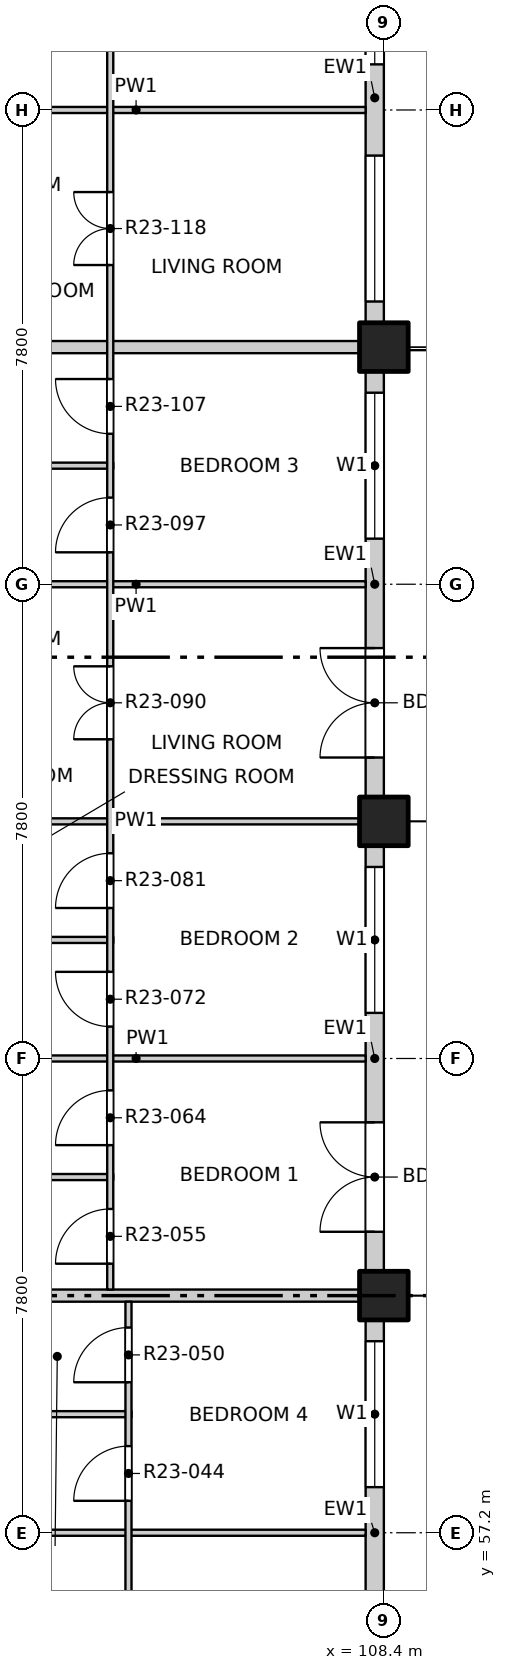
"""IFC4 building model, lengths in metres.
Left out: names, types, materials, properties, quantities, classifications, styles, units other than length and angle.
Written with IfcOpenShell. Run it as: python <this file> out.ifc"""

import sys

from ifc_helpers import new_model, si_unit, direction, frame, frame_2d, origin, origin_2d, place, context, subcontext, project, spatial, rectangle, extrude, element, fill, save


model = new_model("IFC4")
c1 = context("Model", 3, precision=1e-05, world=origin(), true_north=direction((0.0, 1.0)))
c2 = subcontext(c1, "Body", "Model", "MODEL_VIEW")
j1 = project(units=[si_unit("LENGTHUNIT", "METRE"), si_unit("PLANEANGLEUNIT", "RADIAN")], contexts=[c1])
p1 = place(None, origin())
s1 = spatial("IfcSite", under=j1, at=p1, CompositionType="ELEMENT")
p2 = place(p1, origin())
s2 = spatial("IfcBuilding", under=s1, at=p2, CompositionType="ELEMENT")
p3 = place(p2, frame((0.0, 0.0, 238.1)))
s3 = spatial("IfcBuildingStorey", under=s2, at=p3, CompositionType="ELEMENT", Elevation=238.1)
for number, where, z_axis, x_axis in (
    (1, (108.4, 61.1, -0.25), (0.0, 0.0, 1.0), (1.0, 0.0, 0.0)),
    (2, (108.4, 68.9, -0.25), (0.0, 0.0, 1.0), (1.0, 0.0, 0.0)),
    (3, (108.4, 76.7, -0.25), (0.0, 0.0, 1.0), (1.0, 0.0, 0.0)),
):
    element("IfcColumn", number, at=place(p3, frame(where, z_axis=z_axis, x_axis=x_axis)), inside=s3, PredefinedType="COLUMN", context=c2, shape_type="SweptSolid", body=[
        extrude(rectangle(XDim=0.8, YDim=0.8, at=origin_2d()), origin(), (0.0, 0.0, 1.0), 3.35),
    ])
p4 = place(p3, frame((108.25, 53.7, 0.0), z_axis=(0.0, 0.0, 1.0), x_axis=(0.0, 1.0, 0.0)))
e4 = element("IfcWall", 4, at=p4, inside=s3, PredefinedType="SOLIDWALL", context=c2, shape_type="SweptSolid", body=[
    extrude(rectangle(XDim=7.0, YDim=0.3, at=frame_2d((3.5, 0.0))), origin(), (0.0, 0.0, 1.0), 3.1),
])
p5 = place(p4, frame((0.65, 0.0, 0.0)))
e5 = element("IfcOpeningElement", 5, at=p5, cuts=e4, PredefinedType="OPENING", context=c2, shape_type="SweptSolid", body=[
    extrude(rectangle(XDim=1.8, YDim=2.4, at=frame_2d((0.9, 1.2))), frame((0.0, 0.16, 0.0), z_axis=(0.0, -1.0, 0.0), x_axis=(1.0, 0.0, 0.0)), (0.0, 0.0, 1.0), 0.32),
])
p6 = place(p4, frame((4.25, 0.0, 0.9)))
e6 = element("IfcOpeningElement", 6, at=p6, cuts=e4, PredefinedType="OPENING", context=c2, shape_type="SweptSolid", body=[
    extrude(rectangle(XDim=2.4, YDim=1.8, at=frame_2d((1.2, 0.9))), frame((0.0, 0.16, 0.0), z_axis=(0.0, -1.0, 0.0), x_axis=(1.0, 0.0, 0.0)), (0.0, 0.0, 1.0), 0.32),
])
p7 = place(p3, frame((108.25, 61.5, 0.0), z_axis=(0.0, 0.0, 1.0), x_axis=(0.0, 1.0, 0.0)))
e7 = element("IfcWall", 7, at=p7, inside=s3, PredefinedType="SOLIDWALL", context=c2, shape_type="SweptSolid", body=[
    extrude(rectangle(XDim=7.0, YDim=0.3, at=frame_2d((3.5, 0.0))), origin(), (0.0, 0.0, 1.0), 3.1),
])
p8 = place(p7, frame((0.65, 0.0, 0.0)))
e8 = element("IfcOpeningElement", 8, at=p8, cuts=e7, PredefinedType="OPENING", context=c2, shape_type="SweptSolid", body=[
    extrude(rectangle(XDim=1.8, YDim=2.4, at=frame_2d((0.9, 1.2))), frame((0.0, 0.16, 0.0), z_axis=(0.0, -1.0, 0.0), x_axis=(1.0, 0.0, 0.0)), (0.0, 0.0, 1.0), 0.32),
])
p9 = place(p7, frame((4.25, 0.0, 0.9)))
e9 = element("IfcOpeningElement", 9, at=p9, cuts=e7, PredefinedType="OPENING", context=c2, shape_type="SweptSolid", body=[
    extrude(rectangle(XDim=2.4, YDim=1.8, at=frame_2d((1.2, 0.9))), frame((0.0, 0.16, 0.0), z_axis=(0.0, -1.0, 0.0), x_axis=(1.0, 0.0, 0.0)), (0.0, 0.0, 1.0), 0.32),
])
p10 = place(p3, frame((108.25, 69.3, 0.0), z_axis=(0.0, 0.0, 1.0), x_axis=(0.0, 1.0, 0.0)))
e10 = element("IfcWall", 10, at=p10, inside=s3, PredefinedType="SOLIDWALL", context=c2, shape_type="SweptSolid", body=[
    extrude(rectangle(XDim=7.0, YDim=0.3, at=frame_2d((3.5, 0.0))), origin(), (0.0, 0.0, 1.0), 3.1),
])
p11 = place(p10, frame((0.65, 0.0, 0.0)))
e11 = element("IfcOpeningElement", 11, at=p11, cuts=e10, PredefinedType="OPENING", context=c2, shape_type="SweptSolid", body=[
    extrude(rectangle(XDim=1.8, YDim=2.4, at=frame_2d((0.9, 1.2))), frame((0.0, 0.16, 0.0), z_axis=(0.0, -1.0, 0.0), x_axis=(1.0, 0.0, 0.0)), (0.0, 0.0, 1.0), 0.32),
])
p12 = place(p10, frame((4.25, 0.0, 0.9)))
e12 = element("IfcOpeningElement", 12, at=p12, cuts=e10, PredefinedType="OPENING", context=c2, shape_type="SweptSolid", body=[
    extrude(rectangle(XDim=2.4, YDim=1.8, at=frame_2d((1.2, 0.9))), frame((0.0, 0.16, 0.0), z_axis=(0.0, -1.0, 0.0), x_axis=(1.0, 0.0, 0.0)), (0.0, 0.0, 1.0), 0.32),
])
p13 = place(p3, frame((108.25, 77.1, 0.0), z_axis=(0.0, 0.0, 1.0), x_axis=(0.0, 1.0, 0.0)))
e13 = element("IfcWall", 13, at=p13, inside=s3, PredefinedType="SOLIDWALL", context=c2, shape_type="SweptSolid", body=[
    extrude(rectangle(XDim=7.4, YDim=0.3, at=frame_2d((3.7, 0.0))), origin(), (0.0, 0.0, 1.0), 3.1),
])
p14 = place(p13, frame((0.35, 0.0, 0.9)))
e14 = element("IfcOpeningElement", 14, at=p14, cuts=e13, PredefinedType="OPENING", context=c2, shape_type="SweptSolid", body=[
    extrude(rectangle(XDim=2.4, YDim=1.8, at=frame_2d((1.2, 0.9))), frame((0.0, 0.16, 0.0), z_axis=(0.0, -1.0, 0.0), x_axis=(1.0, 0.0, 0.0)), (0.0, 0.0, 1.0), 0.32),
])
p15 = place(p13, frame((4.25, 0.0, 0.9)))
e15 = element("IfcOpeningElement", 15, at=p15, cuts=e13, PredefinedType="OPENING", context=c2, shape_type="SweptSolid", body=[
    extrude(rectangle(XDim=2.4, YDim=1.8, at=frame_2d((1.2, 0.9))), frame((0.0, 0.16, 0.0), z_axis=(0.0, -1.0, 0.0), x_axis=(1.0, 0.0, 0.0)), (0.0, 0.0, 1.0), 0.32),
])
p16 = place(p3, frame((100.55, 57.2, 0.0), z_axis=(0.0, 0.0, 1.0), x_axis=(1.0, 0.0, 0.0)))
e16 = element("IfcWall", 16, at=p16, inside=s3, PredefinedType="PARTITIONING", context=c2, shape_type="SweptSolid", body=[
    extrude(rectangle(XDim=7.55, YDim=0.1, at=frame_2d((3.775, 0.0))), origin(), (0.0, 0.0, 1.0), 3.1),
])
p17 = place(p3, frame((100.55, 59.15, 0.0), z_axis=(0.0, 0.0, 1.0), x_axis=(1.0, 0.0, 0.0)))
e17 = element("IfcWall", 17, at=p17, inside=s3, PredefinedType="PARTITIONING", context=c2, shape_type="SweptSolid", body=[
    extrude(rectangle(XDim=3.7, YDim=0.1, at=frame_2d((1.85, 0.0))), origin(), (0.0, 0.0, 1.0), 3.1),
])
p18 = place(p3, frame((96.6, 61.1, 0.0), z_axis=(0.0, 0.0, 1.0), x_axis=(1.0, 0.0, 0.0)))
e18 = element("IfcWall", 18, at=p18, inside=s3, PredefinedType="PARTITIONING", context=c2, shape_type="SweptSolid", body=[
    extrude(rectangle(XDim=11.5, YDim=0.2, at=frame_2d((5.75, 0.0))), origin(), (0.0, 0.0, 1.0), 3.1),
])
p19 = place(p3, frame((100.55, 63.05, 0.0), z_axis=(0.0, 0.0, 1.0), x_axis=(1.0, 0.0, 0.0)))
e19 = element("IfcWall", 19, at=p19, inside=s3, PredefinedType="PARTITIONING", context=c2, shape_type="SweptSolid", body=[
    extrude(rectangle(XDim=3.4, YDim=0.1, at=frame_2d((1.7, 0.0))), origin(), (0.0, 0.0, 1.0), 3.1),
])
p20 = place(p3, frame((100.55, 65.0, 0.0), z_axis=(0.0, 0.0, 1.0), x_axis=(1.0, 0.0, 0.0)))
e20 = element("IfcWall", 20, at=p20, inside=s3, PredefinedType="PARTITIONING", context=c2, shape_type="SweptSolid", body=[
    extrude(rectangle(XDim=7.55, YDim=0.1, at=frame_2d((3.775, 0.0))), origin(), (0.0, 0.0, 1.0), 3.1),
])
p21 = place(p3, frame((100.55, 66.95, 0.0), z_axis=(0.0, 0.0, 1.0), x_axis=(1.0, 0.0, 0.0)))
e21 = element("IfcWall", 21, at=p21, inside=s3, PredefinedType="PARTITIONING", context=c2, shape_type="SweptSolid", body=[
    extrude(rectangle(XDim=3.4, YDim=0.1, at=frame_2d((1.7, 0.0))), origin(), (0.0, 0.0, 1.0), 3.1),
])
for number, where, z_axis, x_axis in (
    (22, (100.55, 68.9, 0.0), (0.0, 0.0, 1.0), (1.0, 0.0, 0.0)),
    (23, (100.55, 72.8, 0.0), (0.0, 0.0, 1.0), (1.0, 0.0, 0.0)),
):
    element("IfcWall", number, at=place(p3, frame(where, z_axis=z_axis, x_axis=x_axis)), inside=s3, PredefinedType="PARTITIONING", context=c2, shape_type="SweptSolid", body=[
        extrude(rectangle(XDim=7.55, YDim=0.1, at=frame_2d((3.775, 0.0))), origin(), (0.0, 0.0, 1.0), 3.1),
    ])
p22 = place(p3, frame((100.55, 74.75, 0.0), z_axis=(0.0, 0.0, 1.0), x_axis=(1.0, 0.0, 0.0)))
e24 = element("IfcWall", 24, at=p22, inside=s3, PredefinedType="PARTITIONING", context=c2, shape_type="SweptSolid", body=[
    extrude(rectangle(XDim=3.4, YDim=0.1, at=frame_2d((1.7, 0.0))), origin(), (0.0, 0.0, 1.0), 3.1),
])
p23 = place(p3, frame((96.6, 76.7, 0.0), z_axis=(0.0, 0.0, 1.0), x_axis=(1.0, 0.0, 0.0)))
e25 = element("IfcWall", 25, at=p23, inside=s3, PredefinedType="PARTITIONING", context=c2, shape_type="SweptSolid", body=[
    extrude(rectangle(XDim=11.5, YDim=0.2, at=frame_2d((5.75, 0.0))), origin(), (0.0, 0.0, 1.0), 3.1),
])
p24 = place(p3, frame((100.55, 80.6, 0.0), z_axis=(0.0, 0.0, 1.0), x_axis=(1.0, 0.0, 0.0)))
e26 = element("IfcWall", 26, at=p24, inside=s3, PredefinedType="PARTITIONING", context=c2, shape_type="SweptSolid", body=[
    extrude(rectangle(XDim=7.55, YDim=0.1, at=frame_2d((3.775, 0.0))), origin(), (0.0, 0.0, 1.0), 3.1),
])
p25 = place(p3, frame((103.9, 61.2, 0.0), z_axis=(0.0, 0.0, 1.0), x_axis=(0.0, 1.0, 0.0)))
e27 = element("IfcWall", 27, at=p25, inside=s3, PredefinedType="PARTITIONING", context=c2, shape_type="SweptSolid", body=[
    extrude(rectangle(XDim=26.9, YDim=0.1, at=frame_2d((13.45, 0.0))), origin(), (0.0, 0.0, 1.0), 3.1),
])
p26 = place(p25, frame((0.425, 0.0, 0.0)))
e28 = element("IfcOpeningElement", 28, at=p26, cuts=e27, PredefinedType="OPENING", context=c2, shape_type="SweptSolid", body=[
    extrude(rectangle(XDim=0.9, YDim=2.1, at=frame_2d((0.45, 1.05))), frame((0.0, 0.06, 0.0), z_axis=(0.0, -1.0, 0.0), x_axis=(1.0, 0.0, 0.0)), (0.0, 0.0, 1.0), 0.12),
])
p27 = place(p25, frame((2.375, 0.0, 0.0)))
e29 = element("IfcOpeningElement", 29, at=p27, cuts=e27, PredefinedType="OPENING", context=c2, shape_type="SweptSolid", body=[
    extrude(rectangle(XDim=0.9, YDim=2.1, at=frame_2d((0.45, 1.05))), frame((0.0, 0.06, 0.0), z_axis=(0.0, -1.0, 0.0), x_axis=(1.0, 0.0, 0.0)), (0.0, 0.0, 1.0), 0.12),
])
p28 = place(p25, frame((4.325, 0.0, 0.0)))
e30 = element("IfcOpeningElement", 30, at=p28, cuts=e27, PredefinedType="OPENING", context=c2, shape_type="SweptSolid", body=[
    extrude(rectangle(XDim=0.9, YDim=2.1, at=frame_2d((0.45, 1.05))), frame((0.0, 0.06, 0.0), z_axis=(0.0, -1.0, 0.0), x_axis=(1.0, 0.0, 0.0)), (0.0, 0.0, 1.0), 0.12),
])
p29 = place(p25, frame((6.275, 0.0, 0.0)))
e31 = element("IfcOpeningElement", 31, at=p29, cuts=e27, PredefinedType="OPENING", context=c2, shape_type="SweptSolid", body=[
    extrude(rectangle(XDim=0.9, YDim=2.1, at=frame_2d((0.45, 1.05))), frame((0.0, 0.06, 0.0), z_axis=(0.0, -1.0, 0.0), x_axis=(1.0, 0.0, 0.0)), (0.0, 0.0, 1.0), 0.12),
])
p30 = place(p25, frame((9.05, 0.0, 0.0)))
e32 = element("IfcOpeningElement", 32, at=p30, cuts=e27, PredefinedType="OPENING", context=c2, shape_type="SweptSolid", body=[
    extrude(rectangle(XDim=1.2, YDim=2.1, at=frame_2d((0.6, 1.05))), frame((0.0, 0.06, 0.0), z_axis=(0.0, -1.0, 0.0), x_axis=(1.0, 0.0, 0.0)), (0.0, 0.0, 1.0), 0.12),
])
p31 = place(p25, frame((12.125, 0.0, 0.0)))
e33 = element("IfcOpeningElement", 33, at=p31, cuts=e27, PredefinedType="OPENING", context=c2, shape_type="SweptSolid", body=[
    extrude(rectangle(XDim=0.9, YDim=2.1, at=frame_2d((0.45, 1.05))), frame((0.0, 0.06, 0.0), z_axis=(0.0, -1.0, 0.0), x_axis=(1.0, 0.0, 0.0)), (0.0, 0.0, 1.0), 0.12),
])
p32 = place(p25, frame((14.075, 0.0, 0.0)))
e34 = element("IfcOpeningElement", 34, at=p32, cuts=e27, PredefinedType="OPENING", context=c2, shape_type="SweptSolid", body=[
    extrude(rectangle(XDim=0.9, YDim=2.1, at=frame_2d((0.45, 1.05))), frame((0.0, 0.06, 0.0), z_axis=(0.0, -1.0, 0.0), x_axis=(1.0, 0.0, 0.0)), (0.0, 0.0, 1.0), 0.12),
])
p33 = place(p25, frame((16.85, 0.0, 0.0)))
e35 = element("IfcOpeningElement", 35, at=p33, cuts=e27, PredefinedType="OPENING", context=c2, shape_type="SweptSolid", body=[
    extrude(rectangle(XDim=1.2, YDim=2.1, at=frame_2d((0.6, 1.05))), frame((0.0, 0.06, 0.0), z_axis=(0.0, -1.0, 0.0), x_axis=(1.0, 0.0, 0.0)), (0.0, 0.0, 1.0), 0.12),
])
p34 = place(p25, frame((20.75, 0.0, 0.0)))
e36 = element("IfcOpeningElement", 36, at=p34, cuts=e27, PredefinedType="OPENING", context=c2, shape_type="SweptSolid", body=[
    extrude(rectangle(XDim=1.2, YDim=2.1, at=frame_2d((0.6, 1.05))), frame((0.0, 0.06, 0.0), z_axis=(0.0, -1.0, 0.0), x_axis=(1.0, 0.0, 0.0)), (0.0, 0.0, 1.0), 0.12),
])
p35 = place(p25, frame((24.65, 0.0, 0.0)))
e37 = element("IfcOpeningElement", 37, at=p35, cuts=e27, PredefinedType="OPENING", context=c2, shape_type="SweptSolid", body=[
    extrude(rectangle(XDim=1.2, YDim=2.1, at=frame_2d((0.6, 1.05))), frame((0.0, 0.06, 0.0), z_axis=(0.0, -1.0, 0.0), x_axis=(1.0, 0.0, 0.0)), (0.0, 0.0, 1.0), 0.12),
])
p36 = place(p3, frame((104.2, 41.9, 0.0), z_axis=(0.0, 0.0, 1.0), x_axis=(0.0, 1.0, 0.0)))
e38 = element("IfcWall", 38, at=p36, inside=s3, PredefinedType="PARTITIONING", context=c2, shape_type="SweptSolid", body=[
    extrude(rectangle(XDim=19.1, YDim=0.1, at=frame_2d((9.55, 0.0))), origin(), (0.0, 0.0, 1.0), 3.1),
])
p37 = place(p36, frame((1.05, 0.0, 0.0)))
e39 = element("IfcOpeningElement", 39, at=p37, cuts=e38, PredefinedType="OPENING", context=c2, shape_type="SweptSolid", body=[
    extrude(rectangle(XDim=1.2, YDim=2.1, at=frame_2d((0.6, 1.05))), frame((0.0, 0.06, 0.0), z_axis=(0.0, -1.0, 0.0), x_axis=(1.0, 0.0, 0.0)), (0.0, 0.0, 1.0), 0.12),
])
p38 = place(p36, frame((4.125, 0.0, 0.0)))
e40 = element("IfcOpeningElement", 40, at=p38, cuts=e38, PredefinedType="OPENING", context=c2, shape_type="SweptSolid", body=[
    extrude(rectangle(XDim=0.9, YDim=2.1, at=frame_2d((0.45, 1.05))), frame((0.0, 0.06, 0.0), z_axis=(0.0, -1.0, 0.0), x_axis=(1.0, 0.0, 0.0)), (0.0, 0.0, 1.0), 0.12),
])
p39 = place(p36, frame((6.075, 0.0, 0.0)))
e41 = element("IfcOpeningElement", 41, at=p39, cuts=e38, PredefinedType="OPENING", context=c2, shape_type="SweptSolid", body=[
    extrude(rectangle(XDim=0.9, YDim=2.1, at=frame_2d((0.45, 1.05))), frame((0.0, 0.06, 0.0), z_axis=(0.0, -1.0, 0.0), x_axis=(1.0, 0.0, 0.0)), (0.0, 0.0, 1.0), 0.12),
])
p40 = place(p36, frame((8.025, 0.0, 0.0)))
e42 = element("IfcOpeningElement", 42, at=p40, cuts=e38, PredefinedType="OPENING", context=c2, shape_type="SweptSolid", body=[
    extrude(rectangle(XDim=0.9, YDim=2.1, at=frame_2d((0.45, 1.05))), frame((0.0, 0.06, 0.0), z_axis=(0.0, -1.0, 0.0), x_axis=(1.0, 0.0, 0.0)), (0.0, 0.0, 1.0), 0.12),
])
p41 = place(p36, frame((9.975, 0.0, 0.0)))
e43 = element("IfcOpeningElement", 43, at=p41, cuts=e38, PredefinedType="OPENING", context=c2, shape_type="SweptSolid", body=[
    extrude(rectangle(XDim=0.9, YDim=2.1, at=frame_2d((0.45, 1.05))), frame((0.0, 0.06, 0.0), z_axis=(0.0, -1.0, 0.0), x_axis=(1.0, 0.0, 0.0)), (0.0, 0.0, 1.0), 0.12),
])
p42 = place(p36, frame((12.75, 0.0, 0.0)))
e44 = element("IfcOpeningElement", 44, at=p42, cuts=e38, PredefinedType="OPENING", context=c2, shape_type="SweptSolid", body=[
    extrude(rectangle(XDim=1.2, YDim=2.1, at=frame_2d((0.6, 1.05))), frame((0.0, 0.06, 0.0), z_axis=(0.0, -1.0, 0.0), x_axis=(1.0, 0.0, 0.0)), (0.0, 0.0, 1.0), 0.12),
])
p43 = place(p36, frame((15.825, 0.0, 0.0)))
e45 = element("IfcOpeningElement", 45, at=p43, cuts=e38, PredefinedType="OPENING", context=c2, shape_type="SweptSolid", body=[
    extrude(rectangle(XDim=0.9, YDim=2.1, at=frame_2d((0.45, 1.05))), frame((0.0, 0.06, 0.0), z_axis=(0.0, -1.0, 0.0), x_axis=(1.0, 0.0, 0.0)), (0.0, 0.0, 1.0), 0.12),
])
p44 = place(p36, frame((17.775, 0.0, 0.0)))
e46 = element("IfcOpeningElement", 46, at=p44, cuts=e38, PredefinedType="OPENING", context=c2, shape_type="SweptSolid", body=[
    extrude(rectangle(XDim=0.9, YDim=2.1, at=frame_2d((0.45, 1.05))), frame((0.0, 0.06, 0.0), z_axis=(0.0, -1.0, 0.0), x_axis=(1.0, 0.0, 0.0)), (0.0, 0.0, 1.0), 0.12),
])
p45 = place(p6, origin())
e47 = element("IfcWindow", 47, at=p45, inside=s3, PartitioningType="DOUBLE_PANEL_VERTICAL", PredefinedType="WINDOW", context=c2, shape_type="SweptSolid", body=[
    extrude(rectangle(XDim=2.4, YDim=1.8, at=frame_2d((1.2, 0.9))), frame((0.0, 0.03, 0.0), z_axis=(0.0, -1.0, 0.0), x_axis=(1.0, 0.0, 0.0)), (0.0, 0.0, 1.0), 0.06),
])
fill(e6, e47)
p46 = place(p8, origin())
e48 = element("IfcDoor", 48, at=p46, inside=s3, OperationType="DOUBLE_DOOR_SINGLE_SWING", PredefinedType="DOOR", context=c2, shape_type="SweptSolid", body=[
    extrude(rectangle(XDim=1.8, YDim=2.4, at=frame_2d((0.9, 1.2))), frame((0.0, 0.025, 0.0), z_axis=(0.0, -1.0, 0.0), x_axis=(1.0, 0.0, 0.0)), (0.0, 0.0, 1.0), 0.05),
])
fill(e8, e48)
p47 = place(p9, origin())
e49 = element("IfcWindow", 49, at=p47, inside=s3, PartitioningType="DOUBLE_PANEL_VERTICAL", PredefinedType="WINDOW", context=c2, shape_type="SweptSolid", body=[
    extrude(rectangle(XDim=2.4, YDim=1.8, at=frame_2d((1.2, 0.9))), frame((0.0, 0.03, 0.0), z_axis=(0.0, -1.0, 0.0), x_axis=(1.0, 0.0, 0.0)), (0.0, 0.0, 1.0), 0.06),
])
fill(e9, e49)
p48 = place(p11, origin())
e50 = element("IfcDoor", 50, at=p48, inside=s3, OperationType="DOUBLE_DOOR_SINGLE_SWING", PredefinedType="DOOR", context=c2, shape_type="SweptSolid", body=[
    extrude(rectangle(XDim=1.8, YDim=2.4, at=frame_2d((0.9, 1.2))), frame((0.0, 0.025, 0.0), z_axis=(0.0, -1.0, 0.0), x_axis=(1.0, 0.0, 0.0)), (0.0, 0.0, 1.0), 0.05),
])
fill(e11, e50)
p49 = place(p12, origin())
e51 = element("IfcWindow", 51, at=p49, inside=s3, PartitioningType="DOUBLE_PANEL_VERTICAL", PredefinedType="WINDOW", context=c2, shape_type="SweptSolid", body=[
    extrude(rectangle(XDim=2.4, YDim=1.8, at=frame_2d((1.2, 0.9))), frame((0.0, 0.03, 0.0), z_axis=(0.0, -1.0, 0.0), x_axis=(1.0, 0.0, 0.0)), (0.0, 0.0, 1.0), 0.06),
])
fill(e12, e51)
p50 = place(p14, origin())
e52 = element("IfcWindow", 52, at=p50, inside=s3, PartitioningType="DOUBLE_PANEL_VERTICAL", PredefinedType="WINDOW", context=c2, shape_type="SweptSolid", body=[
    extrude(rectangle(XDim=2.4, YDim=1.8, at=frame_2d((1.2, 0.9))), frame((0.0, 0.03, 0.0), z_axis=(0.0, -1.0, 0.0), x_axis=(1.0, 0.0, 0.0)), (0.0, 0.0, 1.0), 0.06),
])
fill(e14, e52)
p51 = place(p15, origin())
e53 = element("IfcWindow", 53, at=p51, inside=s3, PartitioningType="DOUBLE_PANEL_VERTICAL", PredefinedType="WINDOW", context=c2, shape_type="SweptSolid", body=[
    extrude(rectangle(XDim=2.4, YDim=1.8, at=frame_2d((1.2, 0.9))), frame((0.0, 0.03, 0.0), z_axis=(0.0, -1.0, 0.0), x_axis=(1.0, 0.0, 0.0)), (0.0, 0.0, 1.0), 0.06),
])
fill(e15, e53)
p52 = place(p43, origin())
e54 = element("IfcDoor", 54, at=p52, inside=s3, OperationType="SINGLE_SWING_LEFT", PredefinedType="DOOR", context=c2, shape_type="SweptSolid", body=[
    extrude(rectangle(XDim=0.9, YDim=2.1, at=frame_2d((0.45, 1.05))), frame((0.0, 0.025, 0.0), z_axis=(0.0, -1.0, 0.0), x_axis=(1.0, 0.0, 0.0)), (0.0, 0.0, 1.0), 0.05),
])
fill(e45, e54)
p53 = place(p44, origin())
e55 = element("IfcDoor", 55, at=p53, inside=s3, OperationType="SINGLE_SWING_LEFT", PredefinedType="DOOR", context=c2, shape_type="SweptSolid", body=[
    extrude(rectangle(XDim=0.9, YDim=2.1, at=frame_2d((0.45, 1.05))), frame((0.0, 0.025, 0.0), z_axis=(0.0, -1.0, 0.0), x_axis=(1.0, 0.0, 0.0)), (0.0, 0.0, 1.0), 0.05),
])
fill(e46, e55)
p54 = place(p26, origin())
e56 = element("IfcDoor", 56, at=p54, inside=s3, OperationType="SINGLE_SWING_LEFT", PredefinedType="DOOR", context=c2, shape_type="SweptSolid", body=[
    extrude(rectangle(XDim=0.9, YDim=2.1, at=frame_2d((0.45, 1.05))), frame((0.0, 0.025, 0.0), z_axis=(0.0, -1.0, 0.0), x_axis=(1.0, 0.0, 0.0)), (0.0, 0.0, 1.0), 0.05),
])
fill(e28, e56)
p55 = place(p27, origin())
e57 = element("IfcDoor", 57, at=p55, inside=s3, OperationType="SINGLE_SWING_LEFT", PredefinedType="DOOR", context=c2, shape_type="SweptSolid", body=[
    extrude(rectangle(XDim=0.9, YDim=2.1, at=frame_2d((0.45, 1.05))), frame((0.0, 0.025, 0.0), z_axis=(0.0, -1.0, 0.0), x_axis=(1.0, 0.0, 0.0)), (0.0, 0.0, 1.0), 0.05),
])
fill(e29, e57)
p56 = place(p28, origin())
e58 = element("IfcDoor", 58, at=p56, inside=s3, OperationType="SINGLE_SWING_RIGHT", PredefinedType="DOOR", context=c2, shape_type="SweptSolid", body=[
    extrude(rectangle(XDim=0.9, YDim=2.1, at=frame_2d((0.45, 1.05))), frame((0.0, 0.025, 0.0), z_axis=(0.0, -1.0, 0.0), x_axis=(1.0, 0.0, 0.0)), (0.0, 0.0, 1.0), 0.05),
])
fill(e30, e58)
p57 = place(p29, origin())
e59 = element("IfcDoor", 59, at=p57, inside=s3, OperationType="SINGLE_SWING_LEFT", PredefinedType="DOOR", context=c2, shape_type="SweptSolid", body=[
    extrude(rectangle(XDim=0.9, YDim=2.1, at=frame_2d((0.45, 1.05))), frame((0.0, 0.025, 0.0), z_axis=(0.0, -1.0, 0.0), x_axis=(1.0, 0.0, 0.0)), (0.0, 0.0, 1.0), 0.05),
])
fill(e31, e59)
p58 = place(p30, origin())
e60 = element("IfcDoor", 60, at=p58, inside=s3, OperationType="DOUBLE_DOOR_SINGLE_SWING", PredefinedType="DOOR", context=c2, shape_type="SweptSolid", body=[
    extrude(rectangle(XDim=1.2, YDim=2.1, at=frame_2d((0.6, 1.05))), frame((0.0, 0.025, 0.0), z_axis=(0.0, -1.0, 0.0), x_axis=(1.0, 0.0, 0.0)), (0.0, 0.0, 1.0), 0.05),
])
fill(e32, e60)
p59 = place(p31, origin())
e61 = element("IfcDoor", 61, at=p59, inside=s3, OperationType="SINGLE_SWING_LEFT", PredefinedType="DOOR", context=c2, shape_type="SweptSolid", body=[
    extrude(rectangle(XDim=0.9, YDim=2.1, at=frame_2d((0.45, 1.05))), frame((0.0, 0.025, 0.0), z_axis=(0.0, -1.0, 0.0), x_axis=(1.0, 0.0, 0.0)), (0.0, 0.0, 1.0), 0.05),
])
fill(e33, e61)
p60 = place(p32, origin())
e62 = element("IfcDoor", 62, at=p60, inside=s3, OperationType="SINGLE_SWING_RIGHT", PredefinedType="DOOR", context=c2, shape_type="SweptSolid", body=[
    extrude(rectangle(XDim=0.9, YDim=2.1, at=frame_2d((0.45, 1.05))), frame((0.0, 0.025, 0.0), z_axis=(0.0, -1.0, 0.0), x_axis=(1.0, 0.0, 0.0)), (0.0, 0.0, 1.0), 0.05),
])
fill(e34, e62)
p61 = place(p33, origin())
e63 = element("IfcDoor", 63, at=p61, inside=s3, OperationType="DOUBLE_DOOR_SINGLE_SWING", PredefinedType="DOOR", context=c2, shape_type="SweptSolid", body=[
    extrude(rectangle(XDim=1.2, YDim=2.1, at=frame_2d((0.6, 1.05))), frame((0.0, 0.025, 0.0), z_axis=(0.0, -1.0, 0.0), x_axis=(1.0, 0.0, 0.0)), (0.0, 0.0, 1.0), 0.05),
])
fill(e35, e63)
save(model, sys.argv[1])
